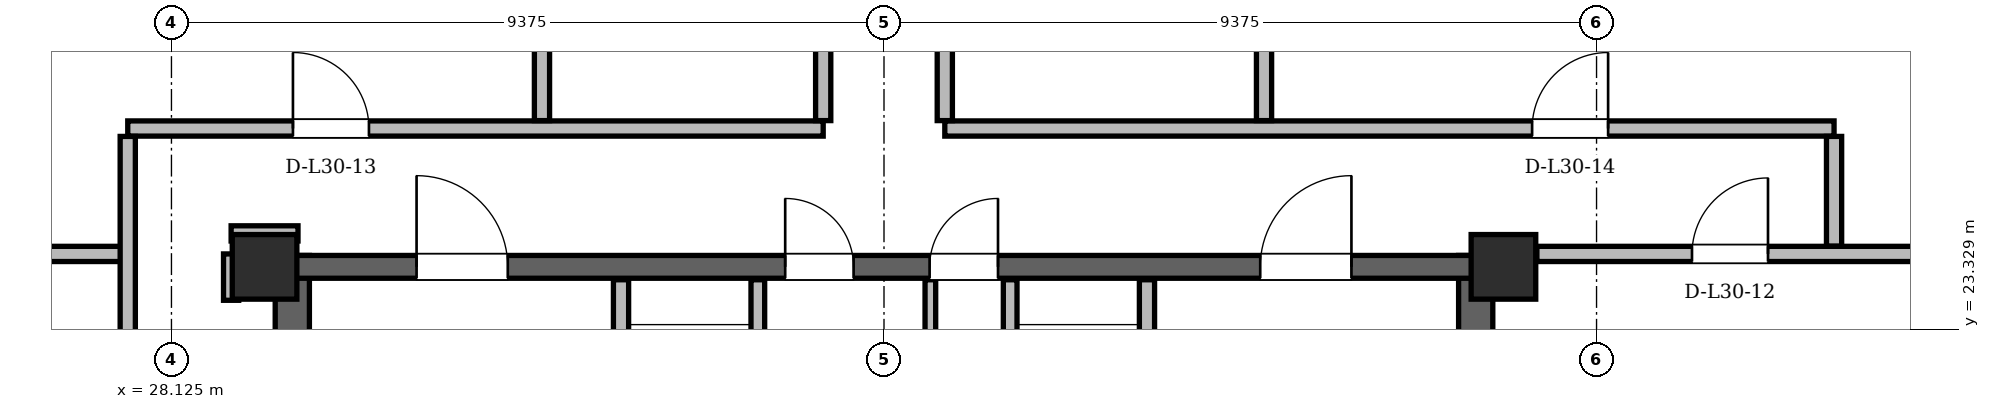
"""IFC4 building model, lengths in metres.
Left out: names, types, materials, properties, quantities, classifications, styles, units other than length and angle.
Written with IfcOpenShell. Run it as: python <this file> out.ifc"""

import sys

from ifc_helpers import new_model, si_unit, direction, frame, frame_2d, origin, origin_2d, place, context, subcontext, project, spatial, rectangle, hollow_rectangle, extrude, element, fill, save


model = new_model("IFC4")
c1 = context("Model", 3, precision=1e-05, world=origin(), true_north=direction((0.0, 1.0)))
c2 = subcontext(c1, "Body", "Model", "MODEL_VIEW")
j1 = project(units=[si_unit("LENGTHUNIT", "METRE"), si_unit("PLANEANGLEUNIT", "RADIAN")], contexts=[c1])
p1 = place(None, origin())
s1 = spatial("IfcSite", under=j1, at=p1, CompositionType="ELEMENT")
p2 = place(p1, origin())
s2 = spatial("IfcBuilding", under=s1, at=p2, CompositionType="ELEMENT")
p3 = place(p2, frame((0.0, 0.0, 115.8)))
s3 = spatial("IfcBuildingStorey", under=s2, at=p3, CompositionType="ELEMENT", Elevation=115.8)
for number, where, z_axis, x_axis in (
    (1, (45.65, 24.15, 0.0), (0.0, 0.0, 1.0), (1.0, 0.0, 0.0)),
    (2, (29.35, 24.15, 0.0), (0.0, 0.0, 1.0), (1.0, 0.0, 0.0)),
):
    element("IfcColumn", number, at=place(p3, frame(where, z_axis=z_axis, x_axis=x_axis)), inside=s3, PredefinedType="COLUMN", context=c2, shape_type="SweptSolid", body=[
        extrude(hollow_rectangle(XDim=0.85, YDim=0.85, WallThickness=0.07, at=origin_2d()), origin(), (0.0, 0.0, 1.0), 3.6),
    ])
for number, where, z_axis, x_axis in (
    (3, (29.715, 11.0, 0.0), (0.0, 0.0, 1.0), (0.0, 1.0, 0.0)),
    (4, (45.285, 11.0, 0.0), (0.0, 0.0, 1.0), (0.0, 1.0, 0.0)),
):
    element("IfcWall", number, at=place(p3, frame(where, z_axis=z_axis, x_axis=x_axis)), inside=s3, PredefinedType="SHEAR", context=c2, shape_type="SweptSolid", body=[
        extrude(rectangle(XDim=13.3, YDim=0.45, at=frame_2d((6.65, 0.0))), origin(), (0.0, 0.0, 1.0), 3.36),
    ])
p4 = place(p3, frame((29.65, 24.15, 0.0), z_axis=(0.0, 0.0, 1.0), x_axis=(1.0, 0.0, 0.0)))
e5 = element("IfcWall", 5, at=p4, inside=s3, PredefinedType="SHEAR", context=c2, shape_type="SweptSolid", body=[
    extrude(rectangle(XDim=15.7, YDim=0.3, at=frame_2d((7.85, 0.0))), origin(), (0.0, 0.0, 1.0), 3.36),
])
p5 = place(p4, frame((1.7, 0.0, 0.0)))
e6 = element("IfcOpeningElement", 6, at=p5, cuts=e5, PredefinedType="OPENING", context=c2, shape_type="SweptSolid", body=[
    extrude(rectangle(XDim=1.2, YDim=2.2, at=frame_2d((0.6, 1.1))), frame((0.0, 0.15, 0.0), z_axis=(0.0, -1.0, 0.0), x_axis=(1.0, 0.0, 0.0)), (0.0, 0.0, 1.0), 0.3),
])
p6 = place(p4, frame((12.8, 0.0, 0.0)))
e7 = element("IfcOpeningElement", 7, at=p6, cuts=e5, PredefinedType="OPENING", context=c2, shape_type="SweptSolid", body=[
    extrude(rectangle(XDim=1.2, YDim=2.2, at=frame_2d((0.6, 1.1))), frame((0.0, 0.15, 0.0), z_axis=(0.0, -1.0, 0.0), x_axis=(1.0, 0.0, 0.0)), (0.0, 0.0, 1.0), 0.3),
])
p7 = place(p4, frame((6.55, 0.0, 0.0)))
e8 = element("IfcOpeningElement", 8, at=p7, cuts=e5, PredefinedType="OPENING", context=c2, shape_type="SweptSolid", body=[
    extrude(rectangle(XDim=0.9, YDim=2.05, at=frame_2d((0.45, 1.025))), frame((0.0, 0.15, 0.0), z_axis=(0.0, -1.0, 0.0), x_axis=(1.0, 0.0, 0.0)), (0.0, 0.0, 1.0), 0.3),
])
p8 = place(p4, frame((8.45, 0.0, 0.0)))
e9 = element("IfcOpeningElement", 9, at=p8, cuts=e5, PredefinedType="OPENING", context=c2, shape_type="SweptSolid", body=[
    extrude(rectangle(XDim=0.9, YDim=2.05, at=frame_2d((0.45, 1.025))), frame((0.0, 0.15, 0.0), z_axis=(0.0, -1.0, 0.0), x_axis=(1.0, 0.0, 0.0)), (0.0, 0.0, 1.0), 0.3),
])
p9 = place(p3, frame((34.04, 19.48, 0.0), z_axis=(0.0, 0.0, 1.0), x_axis=(0.0, 1.0, 0.0)))
e10 = element("IfcWall", 10, at=p9, inside=s3, PredefinedType="PARTITIONING", context=c2, shape_type="SweptSolid", body=[
    extrude(rectangle(XDim=4.5, YDim=0.2, at=frame_2d((2.25, 0.0))), origin(), (0.0, 0.0, 1.0), 2.4),
])
p10 = place(p9, frame((2.12, 0.0, 0.0)))
e11 = element("IfcOpeningElement", 11, at=p10, cuts=e10, PredefinedType="OPENING", context=c2, shape_type="SweptSolid", body=[
    extrude(rectangle(XDim=1.1, YDim=2.2, at=frame_2d((0.55, 1.1))), frame((0.0, 0.1, 0.0), z_axis=(0.0, -1.0, 0.0), x_axis=(1.0, 0.0, 0.0)), (0.0, 0.0, 1.0), 0.2),
])
p11 = place(p3, frame((35.84, 20.96, 0.0), z_axis=(0.0, 0.0, 1.0), x_axis=(0.0, 1.0, 0.0)))
e12 = element("IfcWall", 12, at=p11, inside=s3, PredefinedType="PARTITIONING", context=c2, shape_type="SweptSolid", body=[
    extrude(rectangle(XDim=3.02, YDim=0.18, at=frame_2d((1.51, 0.0))), origin(), (0.0, 0.0, 1.0), 2.4),
])
p12 = place(p3, frame((40.96, 19.48, 0.0), z_axis=(0.0, 0.0, 1.0), x_axis=(0.0, 1.0, 0.0)))
e13 = element("IfcWall", 13, at=p12, inside=s3, PredefinedType="PARTITIONING", context=c2, shape_type="SweptSolid", body=[
    extrude(rectangle(XDim=4.5, YDim=0.2, at=frame_2d((2.25, 0.0))), origin(), (0.0, 0.0, 1.0), 2.4),
])
p13 = place(p12, frame((2.12, 0.0, 0.0)))
e14 = element("IfcOpeningElement", 14, at=p13, cuts=e13, PredefinedType="OPENING", context=c2, shape_type="SweptSolid", body=[
    extrude(rectangle(XDim=1.1, YDim=2.2, at=frame_2d((0.55, 1.1))), frame((0.0, 0.1, 0.0), z_axis=(0.0, -1.0, 0.0), x_axis=(1.0, 0.0, 0.0)), (0.0, 0.0, 1.0), 0.2),
])
p14 = place(p3, frame((39.16, 20.96, 0.0), z_axis=(0.0, 0.0, 1.0), x_axis=(0.0, 1.0, 0.0)))
e15 = element("IfcWall", 15, at=p14, inside=s3, PredefinedType="PARTITIONING", context=c2, shape_type="SweptSolid", body=[
    extrude(rectangle(XDim=3.02, YDim=0.18, at=frame_2d((1.51, 0.0))), origin(), (0.0, 0.0, 1.0), 2.4),
])
p15 = place(p3, frame((38.11, 21.06, 0.0), z_axis=(0.0, 0.0, 1.0), x_axis=(0.0, 1.0, 0.0)))
e16 = element("IfcWall", 16, at=p15, inside=s3, PredefinedType="PARTITIONING", context=c2, shape_type="SweptSolid", body=[
    extrude(rectangle(XDim=2.92, YDim=0.14, at=frame_2d((1.46, 0.0))), origin(), (0.0, 0.0, 1.0), 2.4),
])
p16 = place(p3, frame((21.119, 24.32, 0.0), z_axis=(0.0, 0.0, 1.0), x_axis=(1.0, 0.0, 0.0)))
e17 = element("IfcWall", 17, at=p16, inside=s3, PredefinedType="PARTITIONING", context=c2, shape_type="SweptSolid", body=[
    extrude(rectangle(XDim=6.431, YDim=0.2, at=frame_2d((3.216, 0.0))), origin(), (0.0, 0.0, 1.0), 3.36),
])
p17 = place(p3, frame((46.09, 24.32, 0.0), z_axis=(0.0, 0.0, 1.0), x_axis=(1.0, 0.0, 0.0)))
e18 = element("IfcWall", 18, at=p17, inside=s3, PredefinedType="PARTITIONING", context=c2, shape_type="SweptSolid", body=[
    extrude(rectangle(XDim=7.791, YDim=0.2, at=frame_2d((3.896, 0.0))), origin(), (0.0, 0.0, 1.0), 2.946),
])
p18 = place(p17, frame((2.041, 0.0, 0.0)))
e19 = element("IfcOpeningElement", 19, at=p18, cuts=e18, PredefinedType="OPENING", context=c2, shape_type="SweptSolid", body=[
    extrude(rectangle(XDim=1.0, YDim=2.18, at=frame_2d((0.5, 1.09))), frame((0.0, 0.1, 0.0), z_axis=(0.0, -1.0, 0.0), x_axis=(1.0, 0.0, 0.0)), (0.0, 0.0, 1.0), 0.2),
])
p19 = place(p3, frame((28.91, 24.59, 0.0), z_axis=(0.0, 0.0, 1.0), x_axis=(1.0, 0.0, 0.0)))
e20 = element("IfcWall", 20, at=p19, inside=s3, PredefinedType="PARTITIONING", context=c2, shape_type="SweptSolid", body=[
    extrude(rectangle(XDim=0.88, YDim=0.2, at=frame_2d((0.44, 0.0))), origin(), (0.0, 0.0, 1.0), 2.814),
])
p20 = place(p3, frame((27.55, 25.97, 0.0), z_axis=(0.0, 0.0, 1.0), x_axis=(1.0, 0.0, 0.0)))
e21 = element("IfcWall", 21, at=p20, inside=s3, PredefinedType="PARTITIONING", context=c2, shape_type="SweptSolid", body=[
    extrude(rectangle(XDim=9.15, YDim=0.2, at=frame_2d((4.575, 0.0))), origin(), (0.0, 0.0, 1.0), 2.814),
])
p21 = place(p20, frame((2.173, 0.0, 0.0)))
e22 = element("IfcOpeningElement", 22, at=p21, cuts=e21, PredefinedType="OPENING", context=c2, shape_type="SweptSolid", body=[
    extrude(rectangle(XDim=1.0, YDim=2.18, at=frame_2d((0.5, 1.09))), frame((0.0, 0.1, 0.0), z_axis=(0.0, -1.0, 0.0), x_axis=(1.0, 0.0, 0.0)), (0.0, 0.0, 1.0), 0.2),
])
p22 = place(p3, frame((38.3, 25.97, 0.0), z_axis=(0.0, 0.0, 1.0), x_axis=(1.0, 0.0, 0.0)))
e23 = element("IfcWall", 23, at=p22, inside=s3, PredefinedType="PARTITIONING", context=c2, shape_type="SweptSolid", body=[
    extrude(rectangle(XDim=11.7, YDim=0.2, at=frame_2d((5.85, 0.0))), origin(), (0.0, 0.0, 1.0), 2.814),
])
p23 = place(p22, frame((7.727, 0.0, 0.0)))
e24 = element("IfcOpeningElement", 24, at=p23, cuts=e23, PredefinedType="OPENING", context=c2, shape_type="SweptSolid", body=[
    extrude(rectangle(XDim=1.0, YDim=2.18, at=frame_2d((0.5, 1.09))), frame((0.0, 0.1, 0.0), z_axis=(0.0, -1.0, 0.0), x_axis=(1.0, 0.0, 0.0)), (0.0, 0.0, 1.0), 0.2),
])
p24 = place(p3, frame((27.55, 18.554, 0.0), z_axis=(0.0, 0.0, 1.0), x_axis=(0.0, 1.0, 0.0)))
e25 = element("IfcWall", 25, at=p24, inside=s3, PredefinedType="PARTITIONING", context=c2, shape_type="SweptSolid", body=[
    extrude(rectangle(XDim=7.312, YDim=0.2, at=frame_2d((3.656, 0.0))), origin(), (0.0, 0.0, 1.0), 3.36),
])
p25 = place(p3, frame((28.91, 23.71, 0.0), z_axis=(0.0, 0.0, 1.0), x_axis=(0.0, 1.0, 0.0)))
e26 = element("IfcWall", 26, at=p25, inside=s3, PredefinedType="PARTITIONING", context=c2, shape_type="SweptSolid", body=[
    extrude(rectangle(XDim=0.61, YDim=0.2, at=frame_2d((0.305, 0.0))), origin(), (0.0, 0.0, 1.0), 3.36),
])
p26 = place(p3, frame((33.0, 26.074, 0.0), z_axis=(0.0, 0.0, 1.0), x_axis=(0.0, 1.0, 0.0)))
e27 = element("IfcWall", 27, at=p26, inside=s3, PredefinedType="PARTITIONING", context=c2, shape_type="SweptSolid", body=[
    extrude(rectangle(XDim=17.168, YDim=0.2, at=frame_2d((8.584, 0.0))), origin(), (0.0, 0.0, 1.0), 3.36),
])
p27 = place(p3, frame((36.7, 26.074, 0.0), z_axis=(0.0, 0.0, 1.0), x_axis=(0.0, 1.0, 0.0)))
e28 = element("IfcWall", 28, at=p27, inside=s3, PredefinedType="PARTITIONING", context=c2, shape_type="SweptSolid", body=[
    extrude(rectangle(XDim=17.168, YDim=0.2, at=frame_2d((8.584, 0.0))), origin(), (0.0, 0.0, 1.0), 3.36),
])
p28 = place(p27, frame((8.537, 0.0, 0.0)))
e29 = element("IfcOpeningElement", 29, at=p28, cuts=e28, PredefinedType="OPENING", context=c2, shape_type="SweptSolid", body=[
    extrude(rectangle(XDim=1.0, YDim=2.18, at=frame_2d((0.5, 1.09))), frame((0.0, 0.1, 0.0), z_axis=(0.0, -1.0, 0.0), x_axis=(1.0, 0.0, 0.0)), (0.0, 0.0, 1.0), 0.2),
])
p29 = place(p3, frame((38.3, 26.074, 0.0), z_axis=(0.0, 0.0, 1.0), x_axis=(0.0, 1.0, 0.0)))
e30 = element("IfcWall", 30, at=p29, inside=s3, PredefinedType="PARTITIONING", context=c2, shape_type="SweptSolid", body=[
    extrude(rectangle(XDim=13.422, YDim=0.2, at=frame_2d((6.711, 0.0))), origin(), (0.0, 0.0, 1.0), 3.36),
])
p30 = place(p29, frame((8.537, 0.0, 0.0)))
e31 = element("IfcOpeningElement", 31, at=p30, cuts=e30, PredefinedType="OPENING", context=c2, shape_type="SweptSolid", body=[
    extrude(rectangle(XDim=1.0, YDim=2.18, at=frame_2d((0.5, 1.09))), frame((0.0, 0.1, 0.0), z_axis=(0.0, -1.0, 0.0), x_axis=(1.0, 0.0, 0.0)), (0.0, 0.0, 1.0), 0.2),
])
p31 = place(p3, frame((42.5, 26.074, 0.0), z_axis=(0.0, 0.0, 1.0), x_axis=(0.0, 1.0, 0.0)))
e32 = element("IfcWall", 32, at=p31, inside=s3, PredefinedType="PARTITIONING", context=c2, shape_type="SweptSolid", body=[
    extrude(rectangle(XDim=17.168, YDim=0.2, at=frame_2d((8.584, 0.0))), origin(), (0.0, 0.0, 1.0), 3.36),
])
p32 = place(p3, frame((50.0, 24.424, 0.0), z_axis=(0.0, 0.0, 1.0), x_axis=(0.0, 1.0, 0.0)))
e33 = element("IfcWall", 33, at=p32, inside=s3, PredefinedType="PARTITIONING", context=c2, shape_type="SweptSolid", body=[
    extrude(rectangle(XDim=1.442, YDim=0.2, at=frame_2d((0.721, 0.0))), origin(), (0.0, 0.0, 1.0), 3.36),
])
p33 = place(p5, origin())
e34 = element("IfcDoor", 34, at=p33, inside=s3, OperationType="SINGLE_SWING_LEFT", PredefinedType="DOOR", context=c2, shape_type="SweptSolid", body=[
    extrude(rectangle(XDim=1.2, YDim=2.2, at=frame_2d((0.6, 1.1))), frame((0.0, 0.025, 0.0), z_axis=(0.0, -1.0, 0.0), x_axis=(1.0, 0.0, 0.0)), (0.0, 0.0, 1.0), 0.05),
])
fill(e6, e34)
p34 = place(p6, origin())
e35 = element("IfcDoor", 35, at=p34, inside=s3, OperationType="SINGLE_SWING_RIGHT", PredefinedType="DOOR", context=c2, shape_type="SweptSolid", body=[
    extrude(rectangle(XDim=1.2, YDim=2.2, at=frame_2d((0.6, 1.1))), frame((0.0, 0.025, 0.0), z_axis=(0.0, -1.0, 0.0), x_axis=(1.0, 0.0, 0.0)), (0.0, 0.0, 1.0), 0.05),
])
fill(e7, e35)
p35 = place(p7, origin())
e36 = element("IfcDoor", 36, at=p35, inside=s3, OperationType="SINGLE_SWING_LEFT", PredefinedType="DOOR", context=c2, shape_type="SweptSolid", body=[
    extrude(rectangle(XDim=0.9, YDim=2.05, at=frame_2d((0.45, 1.025))), frame((0.0, 0.025, 0.0), z_axis=(0.0, -1.0, 0.0), x_axis=(1.0, 0.0, 0.0)), (0.0, 0.0, 1.0), 0.05),
])
fill(e8, e36)
p36 = place(p8, origin())
e37 = element("IfcDoor", 37, at=p36, inside=s3, OperationType="SINGLE_SWING_RIGHT", PredefinedType="DOOR", context=c2, shape_type="SweptSolid", body=[
    extrude(rectangle(XDim=0.9, YDim=2.05, at=frame_2d((0.45, 1.025))), frame((0.0, 0.025, 0.0), z_axis=(0.0, -1.0, 0.0), x_axis=(1.0, 0.0, 0.0)), (0.0, 0.0, 1.0), 0.05),
])
fill(e9, e37)
p37 = place(p18, origin())
e38 = element("IfcDoor", 38, at=p37, inside=s3, OperationType="SINGLE_SWING_RIGHT", PredefinedType="DOOR", context=c2, shape_type="SweptSolid", body=[
    extrude(rectangle(XDim=1.0, YDim=2.18, at=frame_2d((0.5, 1.09))), frame((0.0, 0.025, 0.0), z_axis=(0.0, -1.0, 0.0), x_axis=(1.0, 0.0, 0.0)), (0.0, 0.0, 1.0), 0.05),
])
fill(e19, e38)
p38 = place(p21, origin())
e39 = element("IfcDoor", 39, at=p38, inside=s3, OperationType="SINGLE_SWING_LEFT", PredefinedType="DOOR", context=c2, shape_type="SweptSolid", body=[
    extrude(rectangle(XDim=1.0, YDim=2.18, at=frame_2d((0.5, 1.09))), frame((0.0, 0.025, 0.0), z_axis=(0.0, -1.0, 0.0), x_axis=(1.0, 0.0, 0.0)), (0.0, 0.0, 1.0), 0.05),
])
fill(e22, e39)
p39 = place(p23, origin())
e40 = element("IfcDoor", 40, at=p39, inside=s3, OperationType="SINGLE_SWING_RIGHT", PredefinedType="DOOR", context=c2, shape_type="SweptSolid", body=[
    extrude(rectangle(XDim=1.0, YDim=2.18, at=frame_2d((0.5, 1.09))), frame((0.0, 0.025, 0.0), z_axis=(0.0, -1.0, 0.0), x_axis=(1.0, 0.0, 0.0)), (0.0, 0.0, 1.0), 0.05),
])
fill(e24, e40)
save(model, sys.argv[1])
